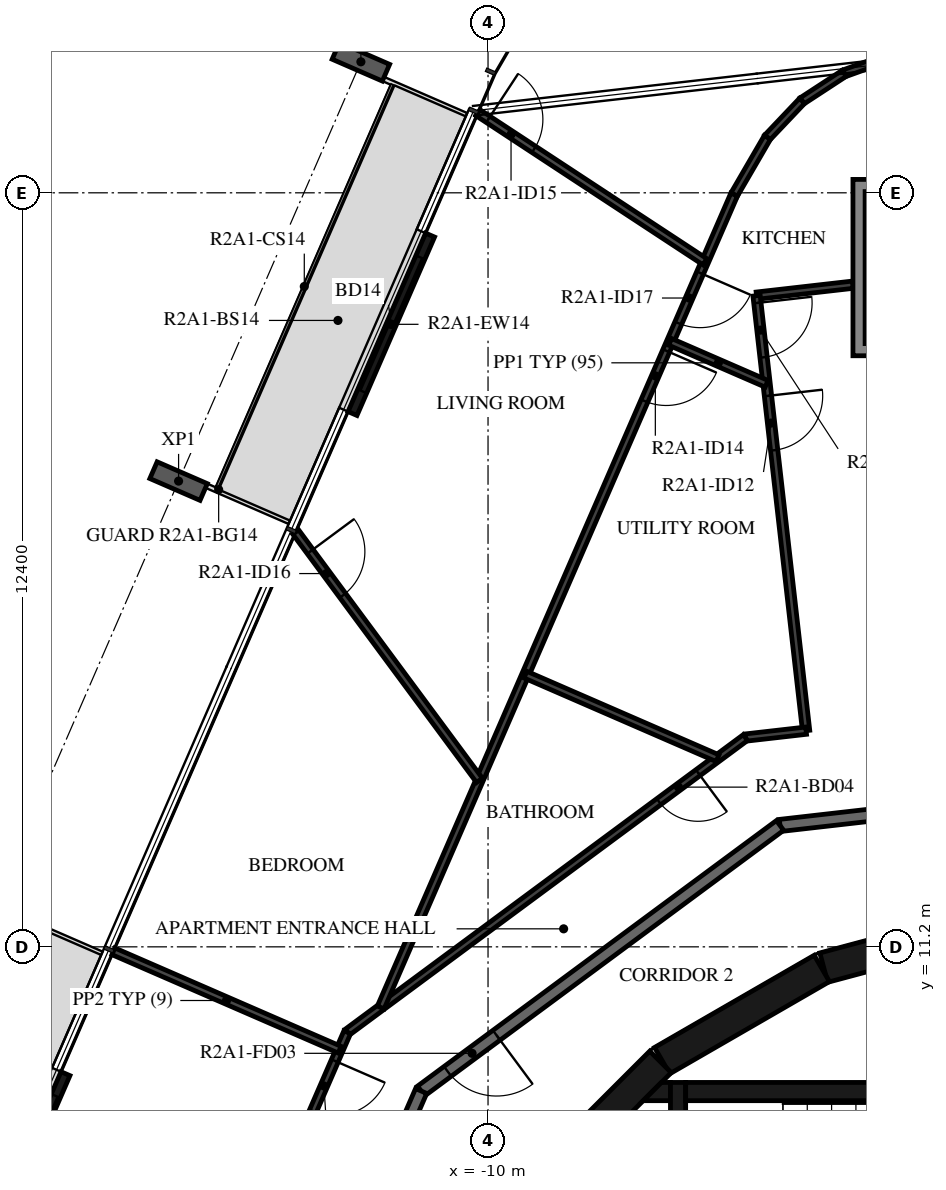
"""IFC4 building model, lengths in metres.
Left out: names, types, materials, properties, quantities, classifications, styles, units other than length and angle.
Written with IfcOpenShell. Run it as: python <this file> out.ifc"""

import sys

from ifc_helpers import new_model, si_unit, direction, frame, frame_2d, origin, origin_2d, place, context, subcontext, project, spatial, polyline, rectangle, i_section, outline, extrude, element, fill, save


model = new_model("IFC4")
c1 = context("Model", 3, precision=1e-05, world=origin(), true_north=direction((0.0, 1.0)))
c2 = subcontext(c1, "Body", "Model", "MODEL_VIEW")
j1 = project(units=[si_unit("LENGTHUNIT", "METRE"), si_unit("PLANEANGLEUNIT", "RADIAN")], contexts=[c1])
p1 = place(None, origin())
s1 = spatial("IfcSite", under=j1, at=p1, CompositionType="ELEMENT")
p2 = place(p1, origin())
s2 = spatial("IfcBuilding", under=s1, at=p2, CompositionType="ELEMENT")
p3 = place(p2, frame((0.0, 0.0, 80.2)))
s3 = spatial("IfcBuildingStorey", under=s2, at=p3, CompositionType="ELEMENT", Elevation=80.2)
for number, where, z_axis, x_axis in (
    (1, (-12.091, 25.754, -0.38), (0.0, 0.0, 1.0), (0.399, 0.917, 0.0)),
    (2, (-15.089, 18.859, -0.38), (0.0, 0.0, 1.0), (0.399, 0.917, 0.0)),
):
    element("IfcColumn", number, at=place(p3, frame(where, z_axis=z_axis, x_axis=x_axis)), inside=s3, PredefinedType="COLUMN", context=c2, shape_type="SweptSolid", body=[
        extrude(i_section(OverallWidth=0.3, OverallDepth=0.9, WebThickness=0.019, FlangeThickness=0.035, FilletRadius=0.03, at=origin_2d()), origin(), (0.0, 0.0, 1.0), 3.5),
    ])
p4 = place(p3, frame((-10.953, 22.905, 0.0), z_axis=(0.0, 0.0, 1.0), x_axis=(-0.398784695066, -0.917044582876, 0.0)))
e3 = element("IfcWall", 3, at=p4, inside=s3, PredefinedType="STANDARD", context=c2, shape_type="SweptSolid", body=[
    extrude(rectangle(XDim=3.2, YDim=0.16, at=frame_2d((1.6, 0.0))), origin(), (0.0, 0.0, 1.0), 3.12),
])
p5 = place(p4, frame((0.4, 0.0, 0.0)))
e4 = element("IfcOpeningElement", 4, at=p5, cuts=e3, PredefinedType="OPENING", context=c2, shape_type="SweptSolid", body=[
    extrude(rectangle(XDim=2.4, YDim=2.4, at=frame_2d((1.2, 1.2))), frame((0.0, 0.09, 0.0), z_axis=(0.0, -1.0, 0.0), x_axis=(1.0, 0.0, 0.0)), (0.0, 0.0, 1.0), 0.18),
])
p6 = place(p3, frame((-16.949, 9.114, 0.0), z_axis=(0.0, 0.0, 1.0), x_axis=(-0.398720531764, -0.917072482168, 0.0)))
e5 = element("IfcWall", 5, at=p6, inside=s3, PredefinedType="STANDARD", context=c2, shape_type="SweptSolid", body=[
    extrude(rectangle(XDim=3.2, YDim=0.16, at=frame_2d((1.6, 0.0))), origin(), (0.0, 0.0, 1.0), 3.12),
])
p7 = place(p6, frame((0.4, 0.0, 0.0)))
e6 = element("IfcOpeningElement", 6, at=p7, cuts=e5, PredefinedType="OPENING", context=c2, shape_type="SweptSolid", body=[
    extrude(rectangle(XDim=2.4, YDim=2.4, at=frame_2d((1.2, 1.2))), frame((0.0, 0.09, 0.0), z_axis=(0.0, -1.0, 0.0), x_axis=(1.0, 0.0, 0.0)), (0.0, 0.0, 1.0), 0.18),
])
for number, where, z_axis, x_axis in (
    (7, (-1.55, 11.643, 0.0), (0.0, 0.0, 1.0), (-0.966, -0.259, 0.0)),
    (8, (-4.51, 10.845, 0.0), (0.0, 0.0, 1.0), (-0.866, -0.5, 0.0)),
):
    element("IfcWall", number, at=place(p3, frame(where, z_axis=z_axis, x_axis=x_axis)), inside=s3, PredefinedType="SHEAR", context=c2, shape_type="SweptSolid", body=[
        extrude(rectangle(XDim=3.033, YDim=0.5, at=frame_2d((1.516, 0.0))), origin(), (0.0, 0.0, 1.0), 3.12),
    ])
p8 = place(p3, frame((-7.164, 9.308, 0.0), z_axis=(0.0, 0.0, 1.0), x_axis=(-0.707106781187, -0.707106781187, 0.0)))
e9 = element("IfcWall", 9, at=p8, inside=s3, PredefinedType="SHEAR", context=c2, shape_type="SweptSolid", body=[
    extrude(rectangle(XDim=3.032, YDim=0.5, at=frame_2d((1.516, 0.0))), origin(), (0.0, 0.0, 1.0), 3.12),
])
p9 = place(p8, frame((1.416, 0.0, 0.0)))
e10 = element("IfcOpeningElement", 10, at=p9, cuts=e9, PredefinedType="OPENING", context=c2, shape_type="SweptSolid", body=[
    extrude(rectangle(XDim=1.2, YDim=2.1, at=frame_2d((0.6, 1.05))), frame((0.0, 0.26, 0.0), z_axis=(0.0, -1.0, 0.0), x_axis=(1.0, 0.0, 0.0)), (0.0, 0.0, 1.0), 0.52),
])
p10 = place(p3, frame((-6.75, 8.82, 0.0), z_axis=(0.0, 0.0, 1.0), x_axis=(1.0, 0.0, 0.0)))
e11 = element("IfcWall", 11, at=p10, inside=s3, PredefinedType="SHEAR", context=c2, shape_type="SweptSolid", body=[
    extrude(rectangle(XDim=6.75, YDim=0.3, at=frame_2d((3.375, 0.0))), origin(), (0.0, 0.0, 1.0), 3.12),
])
p11 = place(p3, frame((-6.875, 8.97, 0.0), z_axis=(0.0, 0.0, 1.0), x_axis=(0.0, -1.0, 0.0)))
e12 = element("IfcWall", 12, at=p11, inside=s3, PredefinedType="SHEAR", context=c2, shape_type="SweptSolid", body=[
    extrude(rectangle(XDim=3.92, YDim=0.25, at=frame_2d((1.96, 0.0))), origin(), (0.0, 0.0, 1.0), 3.12),
])
p12 = place(p11, frame((1.61, 0.0, 0.0)))
e13 = element("IfcOpeningElement", 13, at=p12, cuts=e12, PredefinedType="OPENING", context=c2, shape_type="SweptSolid", body=[
    extrude(rectangle(XDim=1.2, YDim=2.1, at=frame_2d((0.6, 1.05))), frame((0.0, 0.135, 0.0), z_axis=(0.0, -1.0, 0.0), x_axis=(1.0, 0.0, 0.0)), (0.0, 0.0, 1.0), 0.27),
])
p13 = place(p3, origin())
e14 = element("IfcWall", 14, at=p13, inside=s3, PredefinedType="SHEAR", context=c2, shape_type="SweptSolid", body=[
    extrude(outline(polyline([(-7.148, 8.97), (-7.0, 8.97), (-7.0, 8.67), (-7.448, 8.67), (-7.148, 8.97)])), origin(), (0.0, 0.0, 1.0), 3.12),
])
p14 = place(p3, frame((2.096, 14.028, 0.0), z_axis=(0.0, 0.0, 1.0), x_axis=(-0.993569170114, -0.113226782163, 0.0)))
e15 = element("IfcWall", 15, at=p14, inside=s3, PredefinedType="STANDARD", context=c2, shape_type="SweptSolid", body=[
    extrude(rectangle(XDim=7.342, YDim=0.2, at=frame_2d((3.671, 0.0))), origin(), (0.0, 0.0, 1.0), 3.12),
])
p15 = place(p3, frame((-5.198, 13.196, 0.0), z_axis=(0.0, 0.0, 1.0), x_axis=(-0.803869883159, -0.594805187394, 0.0)))
e16 = element("IfcWall", 16, at=p15, inside=s3, PredefinedType="STANDARD", context=c2, shape_type="SweptSolid", body=[
    extrude(rectangle(XDim=7.342, YDim=0.2, at=frame_2d((3.671, 0.0))), origin(), (0.0, 0.0, 1.0), 3.12),
])
p16 = place(p15, frame((5.8, 0.0, 0.0)))
e17 = element("IfcOpeningElement", 17, at=p16, cuts=e16, PredefinedType="OPENING", context=c2, shape_type="SweptSolid", body=[
    extrude(rectangle(XDim=1.0, YDim=2.1, at=frame_2d((0.5, 1.05))), frame((0.0, 0.11, 0.0), z_axis=(0.0, -1.0, 0.0), x_axis=(1.0, 0.0, 0.0)), (0.0, 0.0, 1.0), 0.22),
])
p17 = place(p3, frame((-11.1, 8.829, 0.0), z_axis=(0.0, 0.0, 1.0), x_axis=(-0.398741918631, -0.917063183388, 0.0)))
e18 = element("IfcWall", 18, at=p17, inside=s3, PredefinedType="STANDARD", context=c2, shape_type="SweptSolid", body=[
    extrude(rectangle(XDim=7.342, YDim=0.2, at=frame_2d((3.671, 0.0))), origin(), (0.0, 0.0, 1.0), 3.12),
])
p18 = place(p3, frame((-3.999, 22.089, 0.0), z_axis=(0.0, 0.0, 1.0), x_axis=(-0.993550908639, -0.113386912568, 0.0)))
e19 = element("IfcWall", 19, at=p18, inside=s3, PredefinedType="PARTITIONING", context=c2, shape_type="SweptSolid", body=[
    extrude(rectangle(XDim=1.595, YDim=0.12, at=frame_2d((0.798, 0.0))), origin(), (0.0, 0.0, 1.0), 3.12),
])
p19 = place(p3, frame((-5.584, 21.908, 0.0), z_axis=(0.0, 0.0, 1.0), x_axis=(0.113192725021, -0.993573050662, 0.0)))
e20 = element("IfcWall", 20, at=p19, inside=s3, PredefinedType="PARTITIONING", context=c2, shape_type="SweptSolid", body=[
    extrude(rectangle(XDim=7.2, YDim=0.12, at=frame_2d((3.6, 0.0))), origin(), (0.0, 0.0, 1.0), 3.12),
])
p20 = place(p19, frame((0.12, 0.0, 0.0)))
e21 = element("IfcOpeningElement", 21, at=p20, cuts=e20, PredefinedType="OPENING", context=c2, shape_type="SweptSolid", body=[
    extrude(rectangle(XDim=0.9, YDim=2.1, at=frame_2d((0.45, 1.05))), frame((0.0, 0.07, 0.0), z_axis=(0.0, -1.0, 0.0), x_axis=(1.0, 0.0, 0.0)), (0.0, 0.0, 1.0), 0.14),
])
p21 = place(p19, frame((1.658, 0.0, 0.0)))
e22 = element("IfcOpeningElement", 22, at=p21, cuts=e20, PredefinedType="OPENING", context=c2, shape_type="SweptSolid", body=[
    extrude(rectangle(XDim=0.9, YDim=2.1, at=frame_2d((0.45, 1.05))), frame((0.0, 0.07, 0.0), z_axis=(0.0, -1.0, 0.0), x_axis=(1.0, 0.0, 0.0)), (0.0, 0.0, 1.0), 0.14),
])
p22 = place(p3, frame((-4.769, 14.755, 0.0), z_axis=(0.0, 0.0, 1.0), x_axis=(-0.993568649539, -0.113231350131, 0.0)))
e23 = element("IfcWall", 23, at=p22, inside=s3, PredefinedType="PARTITIONING", context=c2, shape_type="SweptSolid", body=[
    extrude(rectangle(XDim=1.005, YDim=0.12, at=frame_2d((0.502, 0.0))), origin(), (0.0, 0.0, 1.0), 3.12),
])
p23 = place(p3, frame((-5.767, 14.641, 0.0), z_axis=(0.0, 0.0, 1.0), x_axis=(-0.803853364238, -0.594827511807, 0.0)))
e24 = element("IfcWall", 24, at=p23, inside=s3, PredefinedType="PARTITIONING", context=c2, shape_type="SweptSolid", body=[
    extrude(rectangle(XDim=8.146, YDim=0.12, at=frame_2d((4.073, 0.0))), origin(), (0.0, 0.0, 1.0), 3.12),
])
p24 = place(p23, frame((0.97, 0.0, 0.0)))
e25 = element("IfcOpeningElement", 25, at=p24, cuts=e24, PredefinedType="OPENING", context=c2, shape_type="SweptSolid", body=[
    extrude(rectangle(XDim=0.8, YDim=2.1, at=frame_2d((0.4, 1.05))), frame((0.0, 0.07, 0.0), z_axis=(0.0, -1.0, 0.0), x_axis=(1.0, 0.0, 0.0)), (0.0, 0.0, 1.0), 0.14),
])
p25 = place(p3, frame((-12.315, 9.796, 0.0), z_axis=(0.0, 0.0, 1.0), x_axis=(-0.398790200406, -0.917042188812, 0.0)))
e26 = element("IfcWall", 26, at=p25, inside=s3, PredefinedType="PARTITIONING", context=c2, shape_type="SweptSolid", body=[
    extrude(rectangle(XDim=2.646, YDim=0.12, at=frame_2d((1.323, 0.0))), origin(), (0.0, 0.0, 1.0), 3.12),
])
p26 = place(p25, frame((0.513, 0.0, 0.0)))
e27 = element("IfcOpeningElement", 27, at=p26, cuts=e26, PredefinedType="OPENING", context=c2, shape_type="SweptSolid", body=[
    extrude(rectangle(XDim=0.9, YDim=2.1, at=frame_2d((0.45, 1.05))), frame((0.0, 0.07, 0.0), z_axis=(0.0, -1.0, 0.0), x_axis=(1.0, 0.0, 0.0)), (0.0, 0.0, 1.0), 0.14),
])
p27 = place(p3, frame((-3.362, 25.846, 0.0), z_axis=(0.0, 0.0, 1.0), x_axis=(-0.940718391217, -0.33918860303, 0.0)))
e28 = element("IfcWall", 28, at=p27, inside=s3, PredefinedType="PARTITIONING", context=c2, shape_type="SweptSolid", body=[
    extrude(rectangle(XDim=0.829, YDim=0.12, at=frame_2d((0.415, 0.0))), origin(), (0.0, 0.0, 1.0), 3.12),
])
p28 = place(p3, frame((-4.142, 25.565, 0.0), z_axis=(0.0, 0.0, 1.0), x_axis=(-0.837047461437, -0.547130283664, 0.0)))
e29 = element("IfcWall", 29, at=p28, inside=s3, PredefinedType="PARTITIONING", context=c2, shape_type="SweptSolid", body=[
    extrude(rectangle(XDim=0.829, YDim=0.12, at=frame_2d((0.414, 0.0))), origin(), (0.0, 0.0, 1.0), 3.12),
])
p29 = place(p3, frame((-4.835, 25.112, 0.0), z_axis=(0.0, 0.0, 1.0), x_axis=(-0.688463067416, -0.72527140079, 0.0)))
e30 = element("IfcWall", 30, at=p29, inside=s3, PredefinedType="PARTITIONING", context=c2, shape_type="SweptSolid", body=[
    extrude(rectangle(XDim=0.829, YDim=0.12, at=frame_2d((0.415, 0.0))), origin(), (0.0, 0.0, 1.0), 3.12),
])
p30 = place(p3, frame((-5.406, 24.51, 0.0), z_axis=(0.0, 0.0, 1.0), x_axis=(-0.502487709822, -0.864584351858, 0.0)))
e31 = element("IfcWall", 31, at=p30, inside=s3, PredefinedType="PARTITIONING", context=c2, shape_type="SweptSolid", body=[
    extrude(rectangle(XDim=1.087, YDim=0.12, at=frame_2d((0.543, 0.0))), origin(), (0.0, 0.0, 1.0), 3.12),
])
p31 = place(p3, frame((-5.952, 23.571, 0.0), z_axis=(0.0, 0.0, 1.0), x_axis=(-0.398745097158, -0.917061801348, 0.0)))
e32 = element("IfcWall", 32, at=p31, inside=s3, PredefinedType="PARTITIONING", context=c2, shape_type="SweptSolid", body=[
    extrude(rectangle(XDim=14.576, YDim=0.12, at=frame_2d((7.288, 0.0))), origin(), (0.0, 0.0, 1.0), 3.12),
])
p32 = place(p31, frame((2.801, 0.0, 0.0)))
e33 = element("IfcOpeningElement", 33, at=p32, cuts=e32, PredefinedType="OPENING", context=c2, shape_type="SweptSolid", body=[
    extrude(rectangle(XDim=0.9, YDim=2.1, at=frame_2d((0.45, 1.05))), frame((0.0, 0.07, 0.0), z_axis=(0.0, -1.0, 0.0), x_axis=(1.0, 0.0, 0.0)), (0.0, 0.0, 1.0), 0.14),
])
p33 = place(p31, frame((1.405, 0.0, 0.0)))
e34 = element("IfcOpeningElement", 34, at=p33, cuts=e32, PredefinedType="OPENING", context=c2, shape_type="SweptSolid", body=[
    extrude(rectangle(XDim=0.9, YDim=2.1, at=frame_2d((0.45, 1.05))), frame((0.0, 0.07, 0.0), z_axis=(0.0, -1.0, 0.0), x_axis=(1.0, 0.0, 0.0)), (0.0, 0.0, 1.0), 0.14),
])
p34 = place(p3, frame((-7.005, 21.149, 0.0), z_axis=(0.0, 0.0, 1.0), x_axis=(0.917081274718, -0.398700307953, 0.0)))
e35 = element("IfcWall", 35, at=p34, inside=s3, PredefinedType="PARTITIONING", context=c2, shape_type="SweptSolid", body=[
    extrude(rectangle(XDim=1.73, YDim=0.12, at=frame_2d((0.865, 0.0))), origin(), (0.0, 0.0, 1.0), 3.12),
])
p35 = place(p3, frame((-10.165, 24.917, 0.0), z_axis=(0.0, 0.0, 1.0), x_axis=(0.835849562932, -0.548958566876, 0.0)))
e36 = element("IfcWall", 36, at=p35, inside=s3, PredefinedType="PARTITIONING", context=c2, shape_type="SweptSolid", body=[
    extrude(rectangle(XDim=4.465, YDim=0.12, at=frame_2d((2.232, 0.0))), origin(), (0.0, 0.0, 1.0), 2.73),
])
p36 = place(p35, frame((0.2, 0.0, 0.0)))
e37 = element("IfcOpeningElement", 37, at=p36, cuts=e36, PredefinedType="OPENING", context=c2, shape_type="SweptSolid", body=[
    extrude(rectangle(XDim=0.9, YDim=2.1, at=frame_2d((0.45, 1.05))), frame((0.0, 0.07, 0.0), z_axis=(0.0, -1.0, 0.0), x_axis=(1.0, 0.0, 0.0)), (0.0, 0.0, 1.0), 0.14),
])
p37 = place(p3, frame((-9.385, 15.676, 0.0), z_axis=(0.0, 0.0, 1.0), x_axis=(0.917068929701, -0.398728702475, 0.0)))
e38 = element("IfcWall", 38, at=p37, inside=s3, PredefinedType="PARTITIONING", context=c2, shape_type="SweptSolid", body=[
    extrude(rectangle(XDim=3.445, YDim=0.12, at=frame_2d((1.723, 0.0))), origin(), (0.0, 0.0, 1.0), 3.12),
])
p38 = place(p3, frame((-13.163, 18.022, 0.0), z_axis=(0.0, 0.0, 1.0), x_axis=(0.594797671626, -0.803875444226, 0.0)))
e39 = element("IfcWall", 39, at=p38, inside=s3, PredefinedType="PARTITIONING", context=c2, shape_type="SweptSolid", body=[
    extrude(rectangle(XDim=5.081, YDim=0.12, at=frame_2d((2.54, 0.0))), origin(), (0.0, 0.0, 1.0), 3.12),
])
p39 = place(p38, frame((0.4, 0.0, 0.0)))
e40 = element("IfcOpeningElement", 40, at=p39, cuts=e39, PredefinedType="OPENING", context=c2, shape_type="SweptSolid", body=[
    extrude(rectangle(XDim=0.9, YDim=2.1, at=frame_2d((0.45, 1.05))), frame((0.0, 0.07, 0.0), z_axis=(0.0, -1.0, 0.0), x_axis=(1.0, 0.0, 0.0)), (0.0, 0.0, 1.0), 0.14),
])
p40 = place(p3, frame((-16.161, 11.126, 0.0), z_axis=(0.0, 0.0, 1.0), x_axis=(0.91705953326, -0.398750313425, 0.0)))
e41 = element("IfcWall", 41, at=p40, inside=s3, PredefinedType="PARTITIONING", context=c2, shape_type="SweptSolid", body=[
    extrude(rectangle(XDim=4.057, YDim=0.12, at=frame_2d((2.029, 0.0))), origin(), (0.0, 0.0, 1.0), 2.73),
])
p41 = place(p3, origin())
e42 = element("IfcWall", 42, at=p41, inside=s3, PredefinedType="STANDARD", context=c2, shape_type="SweptSolid", body=[
    extrude(outline(polyline([(-1.099, 23.82), (-1.099, 20.92), (-3.999, 20.92), (-3.999, 23.82), (-1.099, 23.82)]), holes=[polyline([(-3.799, 21.12), (-1.299, 21.12), (-1.299, 23.62), (-3.799, 23.62), (-3.799, 21.12)])]), origin(), (0.0, 0.0, 1.0), 3.12),
])
p42 = place(p5, origin())
e43 = element("IfcDoor", 43, at=p42, inside=s3, OperationType="DOUBLE_DOOR_SLIDING", PredefinedType="DOOR", context=c2, shape_type="SweptSolid", body=[
    extrude(rectangle(XDim=2.4, YDim=2.4, at=frame_2d((1.2, 1.2))), frame((0.0, 0.025, 0.0), z_axis=(0.0, -1.0, 0.0), x_axis=(1.0, 0.0, 0.0)), (0.0, 0.0, 1.0), 0.05),
])
fill(e4, e43)
p43 = place(p7, origin())
e44 = element("IfcDoor", 44, at=p43, inside=s3, OperationType="DOUBLE_DOOR_SLIDING", PredefinedType="DOOR", context=c2, shape_type="SweptSolid", body=[
    extrude(rectangle(XDim=2.4, YDim=2.4, at=frame_2d((1.2, 1.2))), frame((0.0, 0.025, 0.0), z_axis=(0.0, -1.0, 0.0), x_axis=(1.0, 0.0, 0.0)), (0.0, 0.0, 1.0), 0.05),
])
fill(e6, e44)
p44 = place(p16, origin())
e45 = element("IfcDoor", 45, at=p44, inside=s3, OperationType="SINGLE_SWING_LEFT", PredefinedType="DOOR", context=c2, shape_type="SweptSolid", body=[
    extrude(rectangle(XDim=1.0, YDim=2.1, at=frame_2d((0.5, 1.05))), frame((0.0, 0.025, 0.0), z_axis=(0.0, -1.0, 0.0), x_axis=(1.0, 0.0, 0.0)), (0.0, 0.0, 1.0), 0.05),
])
fill(e17, e45)
p45 = place(p20, origin())
e46 = element("IfcDoor", 46, at=p45, inside=s3, OperationType="SINGLE_SWING_RIGHT", PredefinedType="DOOR", context=c2, shape_type="SweptSolid", body=[
    extrude(rectangle(XDim=0.9, YDim=2.1, at=frame_2d((0.45, 1.05))), frame((0.0, 0.025, 0.0), z_axis=(0.0, -1.0, 0.0), x_axis=(1.0, 0.0, 0.0)), (0.0, 0.0, 1.0), 0.05),
])
fill(e21, e46)
p46 = place(p21, origin())
e47 = element("IfcDoor", 47, at=p46, inside=s3, OperationType="SINGLE_SWING_LEFT", PredefinedType="DOOR", context=c2, shape_type="SweptSolid", body=[
    extrude(rectangle(XDim=0.9, YDim=2.1, at=frame_2d((0.45, 1.05))), frame((0.0, 0.025, 0.0), z_axis=(0.0, -1.0, 0.0), x_axis=(1.0, 0.0, 0.0)), (0.0, 0.0, 1.0), 0.05),
])
fill(e22, e47)
p47 = place(p24, origin())
e48 = element("IfcDoor", 48, at=p47, inside=s3, OperationType="SINGLE_SWING_LEFT", PredefinedType="DOOR", context=c2, shape_type="SweptSolid", body=[
    extrude(rectangle(XDim=0.8, YDim=2.1, at=frame_2d((0.4, 1.05))), frame((0.0, 0.025, 0.0), z_axis=(0.0, -1.0, 0.0), x_axis=(1.0, 0.0, 0.0)), (0.0, 0.0, 1.0), 0.05),
])
fill(e25, e48)
p48 = place(p26, origin())
e49 = element("IfcDoor", 49, at=p48, inside=s3, OperationType="SINGLE_SWING_LEFT", PredefinedType="DOOR", context=c2, shape_type="SweptSolid", body=[
    extrude(rectangle(XDim=0.9, YDim=2.1, at=frame_2d((0.45, 1.05))), frame((0.0, 0.025, 0.0), z_axis=(0.0, -1.0, 0.0), x_axis=(1.0, 0.0, 0.0)), (0.0, 0.0, 1.0), 0.05),
])
fill(e27, e49)
p49 = place(p32, origin())
e50 = element("IfcDoor", 50, at=p49, inside=s3, OperationType="SINGLE_SWING_LEFT", PredefinedType="DOOR", context=c2, shape_type="SweptSolid", body=[
    extrude(rectangle(XDim=0.9, YDim=2.1, at=frame_2d((0.45, 1.05))), frame((0.0, 0.025, 0.0), z_axis=(0.0, -1.0, 0.0), x_axis=(1.0, 0.0, 0.0)), (0.0, 0.0, 1.0), 0.05),
])
fill(e33, e50)
p50 = place(p36, origin())
e51 = element("IfcDoor", 51, at=p50, inside=s3, OperationType="SINGLE_SWING_LEFT", PredefinedType="DOOR", context=c2, shape_type="SweptSolid", body=[
    extrude(rectangle(XDim=0.9, YDim=2.1, at=frame_2d((0.45, 1.05))), frame((0.0, 0.025, 0.0), z_axis=(0.0, -1.0, 0.0), x_axis=(1.0, 0.0, 0.0)), (0.0, 0.0, 1.0), 0.05),
])
fill(e37, e51)
p51 = place(p39, origin())
e52 = element("IfcDoor", 52, at=p51, inside=s3, OperationType="SINGLE_SWING_RIGHT", PredefinedType="DOOR", context=c2, shape_type="SweptSolid", body=[
    extrude(rectangle(XDim=0.9, YDim=2.1, at=frame_2d((0.45, 1.05))), frame((0.0, 0.025, 0.0), z_axis=(0.0, -1.0, 0.0), x_axis=(1.0, 0.0, 0.0)), (0.0, 0.0, 1.0), 0.05),
])
fill(e40, e52)
p52 = place(p33, origin())
e53 = element("IfcDoor", 53, at=p52, inside=s3, OperationType="SINGLE_SWING_RIGHT", PredefinedType="DOOR", context=c2, shape_type="SweptSolid", body=[
    extrude(rectangle(XDim=0.9, YDim=2.1, at=frame_2d((0.45, 1.05))), frame((0.0, 0.025, 0.0), z_axis=(0.0, -1.0, 0.0), x_axis=(1.0, 0.0, 0.0)), (0.0, 0.0, 1.0), 0.05),
])
fill(e34, e53)
save(model, sys.argv[1])
